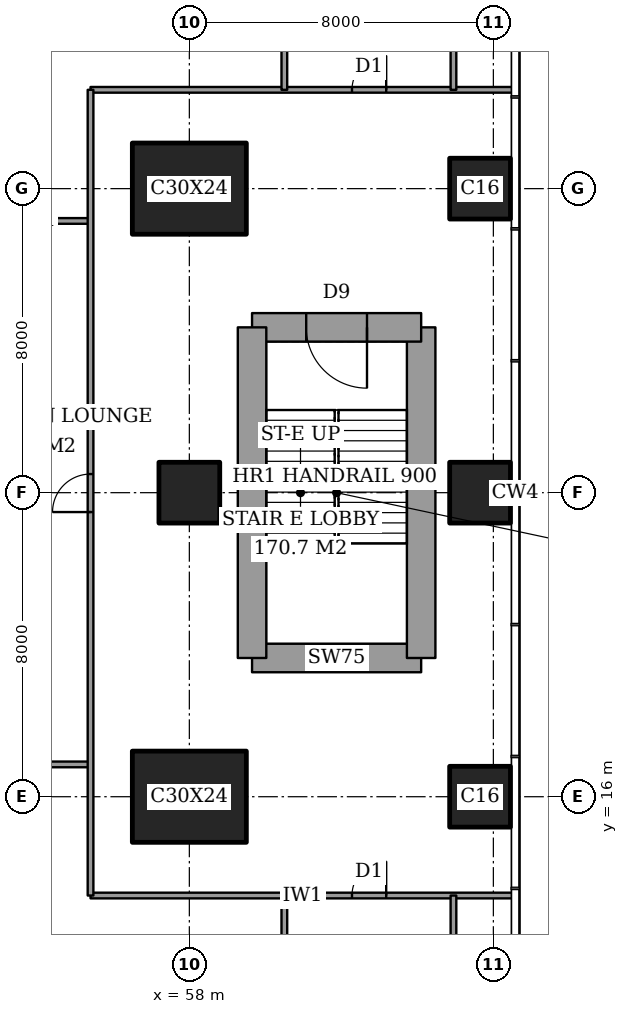
"""IFC4 building model, lengths in metres.
Left out: names, types, materials, properties, quantities, classifications, styles, units other than length and angle.
Written with IfcOpenShell. Run it as: python <this file> out.ifc"""

import sys

from ifc_helpers import new_model, si_unit, direction, frame, frame_2d, origin, origin_2d, place, context, subcontext, project, spatial, rectangle, extrude, element, fill, save


model = new_model("IFC4")
c1 = context("Model", 3, precision=1e-05, world=origin(), true_north=direction((0.0, 1.0)))
c2 = subcontext(c1, "Body", "Model", "MODEL_VIEW")
j1 = project(units=[si_unit("LENGTHUNIT", "METRE"), si_unit("PLANEANGLEUNIT", "RADIAN")], contexts=[c1])
p1 = place(None, origin())
s1 = spatial("IfcSite", under=j1, at=p1, CompositionType="ELEMENT")
p2 = place(p1, origin())
s2 = spatial("IfcBuilding", under=s1, at=p2, CompositionType="ELEMENT")
p3 = place(p2, frame((0.0, 0.0, 225.4)))
s3 = spatial("IfcBuildingStorey", under=s2, at=p3, CompositionType="ELEMENT", Elevation=225.4)
p4 = place(p3, frame((58.0, 16.0, 0.0), z_axis=(0.0, 0.0, 1.0), x_axis=(1.0, 0.0, 0.0)))
e1 = element("IfcColumn", 1, at=p4, inside=s3, PredefinedType="COLUMN", context=c2, shape_type="SweptSolid", body=[
    extrude(rectangle(XDim=3.0, YDim=2.4, at=origin_2d()), origin(), (0.0, 0.0, 1.0), 5.0),
])
p5 = place(p3, frame((58.0, 24.0, 0.0), z_axis=(0.0, 0.0, 1.0), x_axis=(1.0, 0.0, 0.0)))
e2 = element("IfcColumn", 2, at=p5, inside=s3, PredefinedType="COLUMN", context=c2, shape_type="SweptSolid", body=[
    extrude(rectangle(XDim=1.6, YDim=1.6, at=origin_2d()), origin(), (0.0, 0.0, 1.0), 5.0),
])
p6 = place(p3, frame((58.0, 32.0, 0.0), z_axis=(0.0, 0.0, 1.0), x_axis=(1.0, 0.0, 0.0)))
e3 = element("IfcColumn", 3, at=p6, inside=s3, PredefinedType="COLUMN", context=c2, shape_type="SweptSolid", body=[
    extrude(rectangle(XDim=3.0, YDim=2.4, at=origin_2d()), origin(), (0.0, 0.0, 1.0), 5.0),
])
for number, where, z_axis, x_axis in (
    (4, (65.65, 16.0, 0.0), (0.0, 0.0, 1.0), (1.0, 0.0, 0.0)),
    (5, (65.65, 24.0, 0.0), (0.0, 0.0, 1.0), (1.0, 0.0, 0.0)),
    (6, (65.65, 32.0, 0.0), (0.0, 0.0, 1.0), (1.0, 0.0, 0.0)),
):
    element("IfcColumn", number, at=place(p3, frame(where, z_axis=z_axis, x_axis=x_axis)), inside=s3, PredefinedType="COLUMN", context=c2, shape_type="SweptSolid", body=[
        extrude(rectangle(XDim=1.6, YDim=1.6, at=origin_2d()), origin(), (0.0, 0.0, 1.0), 5.0),
    ])
p7 = place(p3, frame((59.65, 19.65, 0.0), z_axis=(0.0, 0.0, 1.0), x_axis=(1.0, 0.0, 0.0)))
e7 = element("IfcWall", 7, at=p7, inside=s3, PredefinedType="SHEAR", context=c2, shape_type="SweptSolid", body=[
    extrude(rectangle(XDim=4.45, YDim=0.75, at=frame_2d((2.225, 0.0))), origin(), (0.0, 0.0, 1.0), 5.0),
])
p8 = place(p3, frame((64.1, 19.65, 0.0), z_axis=(0.0, 0.0, 1.0), x_axis=(0.0, 1.0, 0.0)))
e8 = element("IfcWall", 8, at=p8, inside=s3, PredefinedType="SHEAR", context=c2, shape_type="SweptSolid", body=[
    extrude(rectangle(XDim=8.7, YDim=0.75, at=frame_2d((4.35, 0.0))), origin(), (0.0, 0.0, 1.0), 5.0),
])
p9 = place(p3, frame((64.1, 28.35, 0.0), z_axis=(0.0, 0.0, 1.0), x_axis=(-1.0, 0.0, 0.0)))
e9 = element("IfcWall", 9, at=p9, inside=s3, PredefinedType="SHEAR", context=c2, shape_type="SweptSolid", body=[
    extrude(rectangle(XDim=4.45, YDim=0.75, at=frame_2d((2.225, 0.0))), origin(), (0.0, 0.0, 1.0), 5.0),
])
p10 = place(p9, frame((1.425, 0.0, 0.0)))
e10 = element("IfcOpeningElement", 10, at=p10, cuts=e9, PredefinedType="OPENING", context=c2, shape_type="SweptSolid", body=[
    extrude(rectangle(XDim=1.6, YDim=2.1, at=frame_2d((0.8, 1.05))), frame((0.0, 0.385, 0.0), z_axis=(0.0, -1.0, 0.0), x_axis=(1.0, 0.0, 0.0)), (0.0, 0.0, 1.0), 0.77),
])
p11 = place(p3, frame((59.65, 28.35, 0.0), z_axis=(0.0, 0.0, 1.0), x_axis=(0.0, -1.0, 0.0)))
e11 = element("IfcWall", 11, at=p11, inside=s3, PredefinedType="SHEAR", context=c2, shape_type="SweptSolid", body=[
    extrude(rectangle(XDim=8.7, YDim=0.75, at=frame_2d((4.35, 0.0))), origin(), (0.0, 0.0, 1.0), 5.0),
])
p12 = place(p3, frame((55.4, 13.4, 0.0), z_axis=(0.0, 0.0, 1.0), x_axis=(1.0, 0.0, 0.0)))
e12 = element("IfcWall", 12, at=p12, inside=s3, PredefinedType="PARTITIONING", context=c2, shape_type="SweptSolid", body=[
    extrude(rectangle(XDim=11.161, YDim=0.15, at=frame_2d((5.581, 0.0))), origin(), (0.0, 0.0, 1.0), 4.75),
])
p13 = place(p12, frame((6.88, 0.0, 0.0)))
e13 = element("IfcOpeningElement", 13, at=p13, cuts=e12, PredefinedType="OPENING", context=c2, shape_type="SweptSolid", body=[
    extrude(rectangle(XDim=0.9, YDim=2.1, at=frame_2d((0.45, 1.05))), frame((0.0, 0.085, 0.0), z_axis=(0.0, -1.0, 0.0), x_axis=(1.0, 0.0, 0.0)), (0.0, 0.0, 1.0), 0.17),
])
for number, where, z_axis, x_axis in (
    (14, (52.5, 16.85, 0.0), (0.0, 0.0, 1.0), (1.0, 0.0, 0.0)),
    (15, (52.5, 31.15, 0.0), (0.0, 0.0, 1.0), (1.0, 0.0, 0.0)),
):
    element("IfcWall", number, at=place(p3, frame(where, z_axis=z_axis, x_axis=x_axis)), inside=s3, PredefinedType="PARTITIONING", context=c2, shape_type="SweptSolid", body=[
        extrude(rectangle(XDim=2.9, YDim=0.15, at=frame_2d((1.45, 0.0))), origin(), (0.0, 0.0, 1.0), 4.75),
    ])
p14 = place(p3, frame((55.4, 34.6, 0.0), z_axis=(0.0, 0.0, 1.0), x_axis=(1.0, 0.0, 0.0)))
e16 = element("IfcWall", 16, at=p14, inside=s3, PredefinedType="PARTITIONING", context=c2, shape_type="SweptSolid", body=[
    extrude(rectangle(XDim=11.161, YDim=0.15, at=frame_2d((5.581, 0.0))), origin(), (0.0, 0.0, 1.0), 4.75),
])
p15 = place(p14, frame((6.88, 0.0, 0.0)))
e17 = element("IfcOpeningElement", 17, at=p15, cuts=e16, PredefinedType="OPENING", context=c2, shape_type="SweptSolid", body=[
    extrude(rectangle(XDim=0.9, YDim=2.1, at=frame_2d((0.45, 1.05))), frame((0.0, 0.085, 0.0), z_axis=(0.0, -1.0, 0.0), x_axis=(1.0, 0.0, 0.0)), (0.0, 0.0, 1.0), 0.17),
])
p16 = place(p3, frame((55.4, 13.4, 0.0), z_axis=(0.0, 0.0, 1.0), x_axis=(0.0, 1.0, 0.0)))
e18 = element("IfcWall", 18, at=p16, inside=s3, PredefinedType="PARTITIONING", context=c2, shape_type="SweptSolid", body=[
    extrude(rectangle(XDim=21.2, YDim=0.15, at=frame_2d((10.6, 0.0))), origin(), (0.0, 0.0, 1.0), 4.75),
])
p17 = place(p16, frame((10.09, 0.0, 0.0)))
e19 = element("IfcOpeningElement", 19, at=p17, cuts=e18, PredefinedType="OPENING", context=c2, shape_type="SweptSolid", body=[
    extrude(rectangle(XDim=1.0, YDim=2.1, at=frame_2d((0.5, 1.05))), frame((0.0, 0.085, 0.0), z_axis=(0.0, -1.0, 0.0), x_axis=(1.0, 0.0, 0.0)), (0.0, 0.0, 1.0), 0.17),
])
p18 = place(p3, frame((60.5, -0.45, 0.0), z_axis=(0.0, 0.0, 1.0), x_axis=(0.0, 1.0, 0.0)))
e20 = element("IfcWall", 20, at=p18, inside=s3, PredefinedType="PARTITIONING", context=c2, shape_type="SweptSolid", body=[
    extrude(rectangle(XDim=13.85, YDim=0.15, at=frame_2d((6.925, 0.0))), origin(), (0.0, 0.0, 1.0), 4.75),
])
p19 = place(p18, frame((6.48, 0.0, 0.0)))
e21 = element("IfcOpeningElement", 21, at=p19, cuts=e20, PredefinedType="OPENING", context=c2, shape_type="SweptSolid", body=[
    extrude(rectangle(XDim=0.9, YDim=2.1, at=frame_2d((0.45, 1.05))), frame((0.0, 0.085, 0.0), z_axis=(0.0, -1.0, 0.0), x_axis=(1.0, 0.0, 0.0)), (0.0, 0.0, 1.0), 0.17),
])
p20 = place(p3, frame((60.5, 34.6, 0.0), z_axis=(0.0, 0.0, 1.0), x_axis=(0.0, 1.0, 0.0)))
e22 = element("IfcWall", 22, at=p20, inside=s3, PredefinedType="PARTITIONING", context=c2, shape_type="SweptSolid", body=[
    extrude(rectangle(XDim=13.85, YDim=0.15, at=frame_2d((6.925, 0.0))), origin(), (0.0, 0.0, 1.0), 4.75),
])
p21 = place(p20, frame((6.48, 0.0, 0.0)))
e23 = element("IfcOpeningElement", 23, at=p21, cuts=e22, PredefinedType="OPENING", context=c2, shape_type="SweptSolid", body=[
    extrude(rectangle(XDim=0.9, YDim=2.1, at=frame_2d((0.45, 1.05))), frame((0.0, 0.085, 0.0), z_axis=(0.0, -1.0, 0.0), x_axis=(1.0, 0.0, 0.0)), (0.0, 0.0, 1.0), 0.17),
])
for number, where, z_axis, x_axis in (
    (24, (64.95, 8.8, 0.0), (0.0, 0.0, 1.0), (0.0, 1.0, 0.0)),
    (25, (64.95, 34.6, 0.0), (0.0, 0.0, 1.0), (0.0, 1.0, 0.0)),
):
    element("IfcWall", number, at=place(p3, frame(where, z_axis=z_axis, x_axis=x_axis)), inside=s3, PredefinedType="PARTITIONING", context=c2, shape_type="SweptSolid", body=[
        extrude(rectangle(XDim=4.6, YDim=0.15, at=frame_2d((2.3, 0.0))), origin(), (0.0, 0.0, 1.0), 4.75),
    ])
p22 = place(p17, origin())
e26 = element("IfcDoor", 26, at=p22, inside=s3, OperationType="SINGLE_SWING_RIGHT", PredefinedType="DOOR", context=c2, shape_type="SweptSolid", body=[
    extrude(rectangle(XDim=1.0, YDim=2.1, at=frame_2d((0.5, 1.05))), frame((0.0, 0.025, 0.0), z_axis=(0.0, -1.0, 0.0), x_axis=(1.0, 0.0, 0.0)), (0.0, 0.0, 1.0), 0.05),
])
fill(e19, e26)
p23 = place(p13, origin())
e27 = element("IfcDoor", 27, at=p23, inside=s3, OperationType="SINGLE_SWING_LEFT", PredefinedType="DOOR", context=c2, shape_type="SweptSolid", body=[
    extrude(rectangle(XDim=0.9, YDim=2.1, at=frame_2d((0.45, 1.05))), frame((0.0, 0.025, 0.0), z_axis=(0.0, -1.0, 0.0), x_axis=(1.0, 0.0, 0.0)), (0.0, 0.0, 1.0), 0.05),
])
fill(e13, e27)
p24 = place(p15, origin())
e28 = element("IfcDoor", 28, at=p24, inside=s3, OperationType="SINGLE_SWING_LEFT", PredefinedType="DOOR", context=c2, shape_type="SweptSolid", body=[
    extrude(rectangle(XDim=0.9, YDim=2.1, at=frame_2d((0.45, 1.05))), frame((0.0, 0.025, 0.0), z_axis=(0.0, -1.0, 0.0), x_axis=(1.0, 0.0, 0.0)), (0.0, 0.0, 1.0), 0.05),
])
fill(e17, e28)
p25 = place(p10, origin())
e29 = element("IfcDoor", 29, at=p25, inside=s3, OperationType="DOUBLE_DOOR_SINGLE_SWING", PredefinedType="DOOR", context=c2, shape_type="SweptSolid", body=[
    extrude(rectangle(XDim=1.6, YDim=2.1, at=frame_2d((0.8, 1.05))), frame((0.0, 0.025, 0.0), z_axis=(0.0, -1.0, 0.0), x_axis=(1.0, 0.0, 0.0)), (0.0, 0.0, 1.0), 0.05),
])
fill(e10, e29)
save(model, sys.argv[1])
